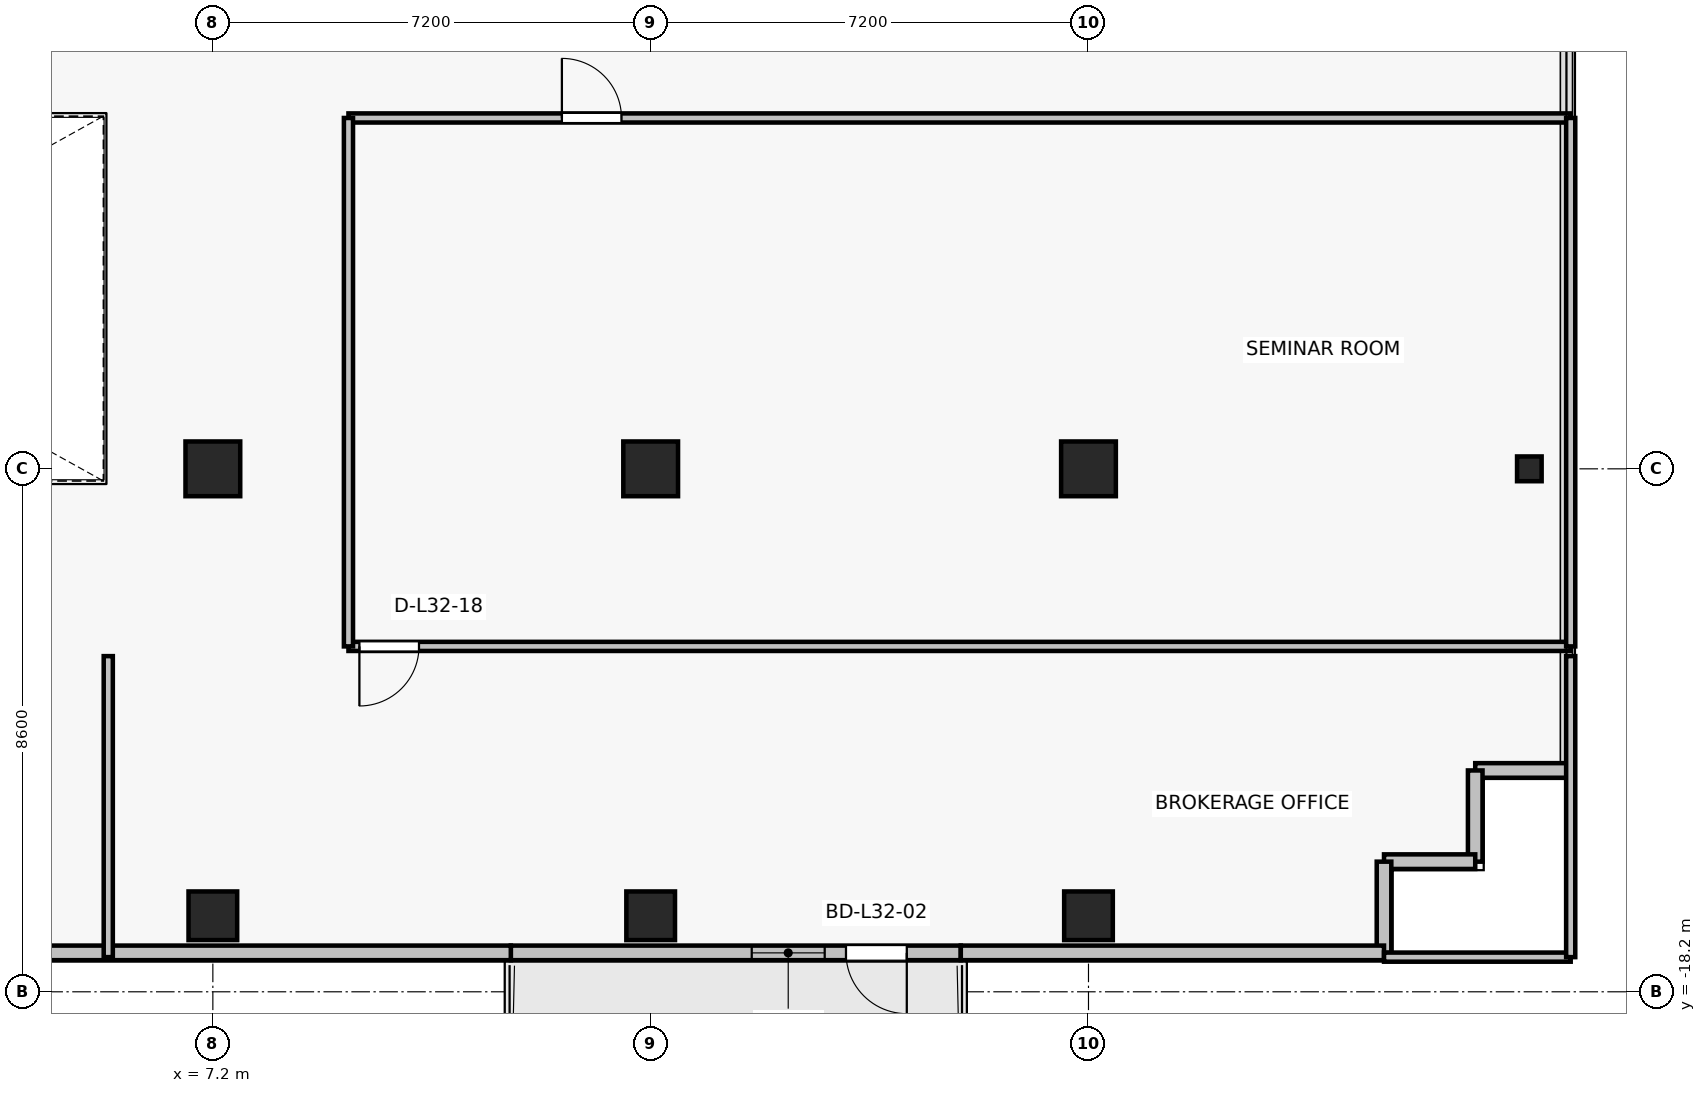
"""IFC4 building model, lengths in metres.
Left out: names, types, materials, properties, quantities, classifications, styles, units other than length and angle.
Written with IfcOpenShell. Run it as: python <this file> out.ifc"""

import sys

from ifc_helpers import new_model, si_unit, direction, frame, frame_2d, origin, origin_2d, place, context, subcontext, project, spatial, rectangle, i_section, extrude, source, transform, mapped, element, fill, save


model = new_model("IFC4")
c1 = context("Model", 3, precision=1e-05, world=origin(), true_north=direction((0.0, 1.0)))
c2 = subcontext(c1, "Body", "Model", "MODEL_VIEW")
j1 = project(units=[si_unit("LENGTHUNIT", "METRE"), si_unit("PLANEANGLEUNIT", "RADIAN")], contexts=[c1])
p1 = place(None, origin())
s1 = spatial("IfcSite", under=j1, at=p1, CompositionType="ELEMENT")
p2 = place(p1, origin())
s2 = spatial("IfcBuilding", under=s1, at=p2, CompositionType="ELEMENT")
p3 = place(p2, frame((0.0, 0.0, 116.5)))
s3 = spatial("IfcBuildingStorey", under=s2, at=p3, CompositionType="ELEMENT", Elevation=116.5)
for number, where, z_axis, x_axis in (
    (1, (7.2, -9.6, 0.0), (0.0, 0.0, 1.0), (1.0, 0.0, 0.0)),
    (2, (14.4, -9.6, 0.0), (0.0, 0.0, 1.0), (1.0, 0.0, 0.0)),
    (3, (21.6, -9.6, 0.0), (0.0, 0.0, 1.0), (1.0, 0.0, 0.0)),
):
    element("IfcColumn", number, at=place(p3, frame(where, z_axis=z_axis, x_axis=x_axis)), inside=s3, PredefinedType="COLUMN", context=c2, shape_type="SweptSolid", body=[
        extrude(rectangle(XDim=0.9, YDim=0.9, at=origin_2d()), origin(), (0.0, 0.0, 1.0), 3.3),
    ])
for number, where, z_axis, x_axis in (
    (4, (7.2, -16.95, 0.0), (0.0, 0.0, 1.0), (1.0, 0.0, 0.0)),
    (5, (14.4, -16.95, 0.0), (0.0, 0.0, 1.0), (1.0, 0.0, 0.0)),
    (6, (21.6, -16.95, 0.0), (0.0, 0.0, 1.0), (1.0, 0.0, 0.0)),
):
    element("IfcColumn", number, at=place(p3, frame(where, z_axis=z_axis, x_axis=x_axis)), inside=s3, PredefinedType="COLUMN", context=c2, shape_type="SweptSolid", body=[
        extrude(rectangle(XDim=0.8, YDim=0.8, at=origin_2d()), origin(), (0.0, 0.0, 1.0), 3.3),
    ])
p4 = place(p3, frame((28.85, -9.6, 0.0), z_axis=(0.0, 0.0, 1.0), x_axis=(1.0, 0.0, 0.0)))
e7 = element("IfcColumn", 7, at=p4, inside=s3, PredefinedType="COLUMN", context=c2, shape_type="SweptSolid", body=[
    extrude(i_section(OverallWidth=0.404, OverallDepth=0.407, WebThickness=0.022, FlangeThickness=0.032, FilletRadius=0.015, at=origin_2d()), origin(), (0.0, 0.0, 1.0), 3.3),
])
p5 = place(p3, frame((19.5, -17.56, 0.0), z_axis=(0.0, 0.0, 1.0), x_axis=(-1.0, 0.0, 0.0)))
e8 = element("IfcWall", 8, at=p5, inside=s3, PredefinedType="SOLIDWALL", context=c2, shape_type="SweptSolid", body=[
    extrude(rectangle(XDim=7.4, YDim=0.24, at=frame_2d((3.7, 0.0))), origin(), (0.0, 0.0, 1.0), 2.665),
])
p6 = place(p5, frame((0.888, 0.0, 0.0)))
e9 = element("IfcOpeningElement", 9, at=p6, cuts=e8, PredefinedType="OPENING", context=c2, shape_type="SweptSolid", body=[
    extrude(rectangle(XDim=1.0, YDim=2.2, at=frame_2d((0.5, 1.1))), frame((0.0, 0.13, 0.0), z_axis=(0.0, -1.0, 0.0), x_axis=(1.0, 0.0, 0.0)), (0.0, 0.0, 1.0), 0.26),
])
p7 = place(p5, frame((2.238, 0.0, 0.85)))
e10 = element("IfcOpeningElement", 10, at=p7, cuts=e8, PredefinedType="OPENING", context=c2, shape_type="SweptSolid", body=[
    extrude(rectangle(XDim=1.2, YDim=1.5, at=frame_2d((0.6, 0.75))), frame((0.0, 0.13, 0.0), z_axis=(0.0, -1.0, 0.0), x_axis=(1.0, 0.0, 0.0)), (0.0, 0.0, 1.0), 0.26),
])
for number, where, z_axis, x_axis in (
    (11, (27.96, -14.56, 0.0), (0.0, 0.0, 1.0), (1.0, 0.0, 0.0)),
    (12, (27.96, -16.06, 0.0), (0.0, 0.0, 1.0), (0.0, 1.0, 0.0)),
    (13, (26.46, -16.06, 0.0), (0.0, 0.0, 1.0), (1.0, 0.0, 0.0)),
    (14, (26.46, -17.56, 0.0), (0.0, 0.0, 1.0), (0.0, 1.0, 0.0)),
):
    element("IfcWall", number, at=place(p3, frame(where, z_axis=z_axis, x_axis=x_axis)), inside=s3, PredefinedType="SOLIDWALL", context=c2, shape_type="SweptSolid", body=[
        extrude(rectangle(XDim=1.5, YDim=0.24, at=frame_2d((0.75, 0.0))), origin(), (0.0, 0.0, 1.0), 3.075),
    ])
p8 = place(p3, frame((19.5, -17.56, 0.0), z_axis=(0.0, 0.0, 1.0), x_axis=(1.0, 0.0, 0.0)))
e15 = element("IfcWall", 15, at=p8, inside=s3, PredefinedType="SOLIDWALL", context=c2, shape_type="SweptSolid", body=[
    extrude(rectangle(XDim=6.96, YDim=0.24, at=frame_2d((3.48, 0.0))), origin(), (0.0, 0.0, 1.0), 2.665),
])
p9 = place(p3, frame((3.34, -17.56, 0.0), z_axis=(0.0, 0.0, 1.0), x_axis=(1.0, 0.0, 0.0)))
e16 = element("IfcWall", 16, at=p9, inside=s3, PredefinedType="SOLIDWALL", context=c2, shape_type="SweptSolid", body=[
    extrude(rectangle(XDim=8.76, YDim=0.24, at=frame_2d((4.38, 0.0))), origin(), (0.0, 0.0, 1.0), 3.075),
])
p10 = place(p3, frame((29.53, -12.52, 0.0), z_axis=(0.0, 0.0, 1.0), x_axis=(-1.0, 0.0, 0.0)))
e17 = element("IfcWall", 17, at=p10, inside=s3, PredefinedType="PARTITIONING", context=c2, shape_type="SweptSolid", body=[
    extrude(rectangle(XDim=20.1, YDim=0.15, at=frame_2d((10.05, 0.0))), origin(), (0.0, 0.0, 1.0), 2.515),
])
p11 = place(p10, frame((18.94, 0.0, 0.0)))
e18 = element("IfcOpeningElement", 18, at=p11, cuts=e17, PredefinedType="OPENING", context=c2, shape_type="SweptSolid", body=[
    extrude(rectangle(XDim=0.98, YDim=2.15, at=frame_2d((0.49, 1.075))), frame((0.0, 0.085, 0.0), z_axis=(0.0, -1.0, 0.0), x_axis=(1.0, 0.0, 0.0)), (0.0, 0.0, 1.0), 0.17),
])
p12 = place(p3, frame((9.43, -3.83, 0.0), z_axis=(0.0, 0.0, 1.0), x_axis=(1.0, 0.0, 0.0)))
e19 = element("IfcWall", 19, at=p12, inside=s3, PredefinedType="PARTITIONING", context=c2, shape_type="SweptSolid", body=[
    extrude(rectangle(XDim=20.1, YDim=0.15, at=frame_2d((10.05, 0.0))), origin(), (0.0, 0.0, 1.0), 2.515),
])
p13 = place(p12, frame((3.51, 0.0, 0.0)))
e20 = element("IfcOpeningElement", 20, at=p13, cuts=e19, PredefinedType="OPENING", context=c2, shape_type="SweptSolid", body=[
    extrude(rectangle(XDim=0.98, YDim=2.15, at=frame_2d((0.49, 1.075))), frame((0.0, 0.085, 0.0), z_axis=(0.0, -1.0, 0.0), x_axis=(1.0, 0.0, 0.0)), (0.0, 0.0, 1.0), 0.17),
])
p14 = place(p3, frame((9.43, -12.52, 0.0), z_axis=(0.0, 0.0, 1.0), x_axis=(0.0, 1.0, 0.0)))
e21 = element("IfcWall", 21, at=p14, inside=s3, PredefinedType="PARTITIONING", context=c2, shape_type="SweptSolid", body=[
    extrude(rectangle(XDim=8.69, YDim=0.15, at=frame_2d((4.345, 0.0))), origin(), (0.0, 0.0, 1.0), 2.515),
])
p15 = place(p3, frame((29.53, -3.83, 0.0), z_axis=(0.0, 0.0, 1.0), x_axis=(0.0, -1.0, 0.0)))
e22 = element("IfcWall", 22, at=p15, inside=s3, PredefinedType="PARTITIONING", context=c2, shape_type="SweptSolid", body=[
    extrude(rectangle(XDim=8.69, YDim=0.15, at=frame_2d((4.345, 0.0))), origin(), (0.0, 0.0, 1.0), 2.665),
])
p16 = place(p3, frame((29.53, -17.63, 0.0), z_axis=(0.0, 0.0, 1.0), x_axis=(-1.0, 0.0, 0.0)))
e23 = element("IfcWall", 23, at=p16, inside=s3, PredefinedType="PARTITIONING", context=c2, shape_type="SweptSolid", body=[
    extrude(rectangle(XDim=3.07, YDim=0.15, at=frame_2d((1.535, 0.0))), origin(), (0.0, 0.0, 1.0), 2.665),
])
p17 = place(p3, frame((5.48, -17.63, 0.0), z_axis=(0.0, 0.0, 1.0), x_axis=(0.0, 1.0, 0.0)))
e24 = element("IfcWall", 24, at=p17, inside=s3, PredefinedType="PARTITIONING", context=c2, shape_type="SweptSolid", body=[
    extrude(rectangle(XDim=4.95, YDim=0.15, at=frame_2d((2.475, 0.0))), origin(), (0.0, 0.0, 1.0), 2.565),
])
p18 = place(p3, frame((29.53, -12.68, 0.0), z_axis=(0.0, 0.0, 1.0), x_axis=(0.0, -1.0, 0.0)))
e25 = element("IfcWall", 25, at=p18, inside=s3, PredefinedType="PARTITIONING", context=c2, shape_type="SweptSolid", body=[
    extrude(rectangle(XDim=4.95, YDim=0.15, at=frame_2d((2.475, 0.0))), origin(), (0.0, 0.0, 1.0), 3.075),
])
m1 = source(origin(), c2, "Body", "SweptSolid", [
    extrude(rectangle(XDim=1.0, YDim=2.2, at=frame_2d((0.5, 1.1))), frame((0.0, 0.025, 0.0), z_axis=(0.0, -1.0, 0.0), x_axis=(1.0, 0.0, 0.0)), (0.0, 0.0, 1.0), 0.05),
])
p19 = place(p6, origin())
e26 = element("IfcDoor", 26, at=p19, inside=s3, OperationType="SINGLE_SWING_LEFT", PredefinedType="DOOR", context=c2, shape_type="MappedRepresentation", body=[
    mapped(m1, transform((0.0, 0.0, 0.0), x_axis=(1.0, 0.0, 0.0), y_axis=(0.0, 1.0, 0.0), z_axis=(0.0, 0.0, 1.0), scale=1.0)),
])
fill(e9, e26)
m2 = source(origin(), c2, "Body", "SweptSolid", [
    extrude(rectangle(XDim=1.2, YDim=1.5, at=frame_2d((0.6, 0.75))), frame((0.0, 0.03, 0.0), z_axis=(0.0, -1.0, 0.0), x_axis=(1.0, 0.0, 0.0)), (0.0, 0.0, 1.0), 0.06),
])
p20 = place(p7, origin())
e27 = element("IfcWindow", 27, at=p20, inside=s3, PartitioningType="SINGLE_PANEL", PredefinedType="WINDOW", context=c2, shape_type="MappedRepresentation", body=[
    mapped(m2, transform((0.0, 0.0, 0.0), x_axis=(1.0, 0.0, 0.0), y_axis=(0.0, 1.0, 0.0), z_axis=(0.0, 0.0, 1.0), scale=1.0)),
])
fill(e10, e27)
m3 = source(origin(), c2, "Body", "SweptSolid", [
    extrude(rectangle(XDim=0.98, YDim=2.15, at=frame_2d((0.49, 1.075))), frame((0.0, 0.025, 0.0), z_axis=(0.0, -1.0, 0.0), x_axis=(1.0, 0.0, 0.0)), (0.0, 0.0, 1.0), 0.05),
])
p21 = place(p13, origin())
e28 = element("IfcDoor", 28, at=p21, inside=s3, OperationType="SINGLE_SWING_LEFT", PredefinedType="DOOR", context=c2, shape_type="MappedRepresentation", body=[
    mapped(m3, transform((0.0, 0.0, 0.0), x_axis=(1.0, 0.0, 0.0), y_axis=(0.0, 1.0, 0.0), z_axis=(0.0, 0.0, 1.0), scale=1.0)),
])
fill(e20, e28)
p22 = place(p11, origin())
e29 = element("IfcDoor", 29, at=p22, inside=s3, OperationType="SINGLE_SWING_RIGHT", PredefinedType="DOOR", context=c2, shape_type="MappedRepresentation", body=[
    mapped(m3, transform((0.0, 0.0, 0.0), x_axis=(1.0, 0.0, 0.0), y_axis=(0.0, 1.0, 0.0), z_axis=(0.0, 0.0, 1.0), scale=1.0)),
])
fill(e18, e29)
save(model, sys.argv[1])
